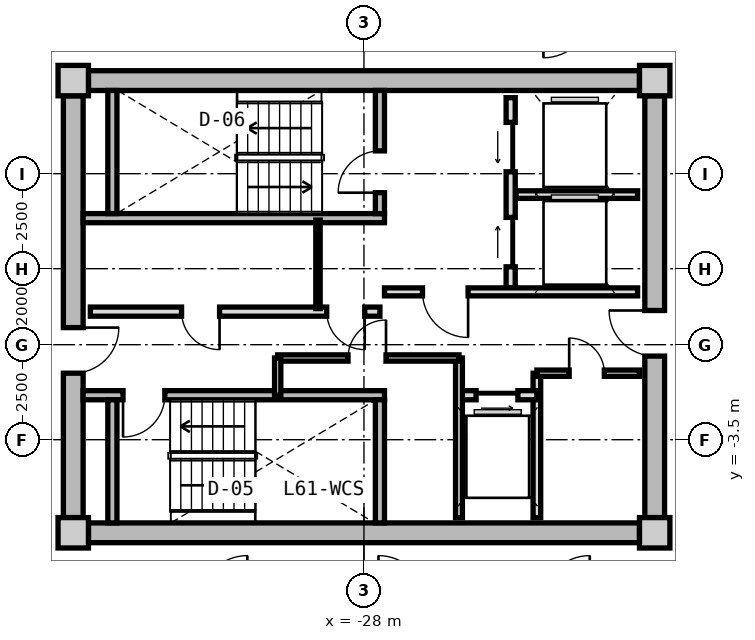
"""IFC4 building model, lengths in metres.
Left out: names, types, materials, properties, quantities, classifications, styles, units other than length and angle.
Written with IfcOpenShell. Run it as: python <this file> out.ifc"""

import sys

from ifc_helpers import new_model, si_unit, direction, frame, frame_2d, origin, origin_2d, place, context, subcontext, project, spatial, rectangle, extrude, source, transform, mapped, element, fill, save


model = new_model("IFC4")
c1 = context("Model", 3, precision=1e-05, world=origin(), true_north=direction((0.0, 1.0)))
c2 = subcontext(c1, "Body", "Model", "MODEL_VIEW")
j1 = project(units=[si_unit("LENGTHUNIT", "METRE"), si_unit("PLANEANGLEUNIT", "RADIAN")], contexts=[c1])
p1 = place(None, origin())
s1 = spatial("IfcSite", under=j1, at=p1, CompositionType="ELEMENT")
p2 = place(p1, origin())
s2 = spatial("IfcBuilding", under=s1, at=p2, CompositionType="ELEMENT")
p3 = place(p2, frame((0.0, 0.0, 196.75)))
s3 = spatial("IfcBuildingStorey", under=s2, at=p3, CompositionType="ELEMENT", Elevation=196.75)
m1 = source(origin(), c2, "Body", "SweptSolid", [
    extrude(rectangle(XDim=0.8, YDim=0.8, at=origin_2d()), origin(), (0.0, 0.0, 1.0), 3.05),
])
for number, where, z_axis, x_axis in (
    (1, (-35.65, -5.95, 0.0), (0.0, 0.0, 1.0), (1.0, 0.0, 0.0)),
    (2, (-20.35, -5.95, 0.0), (0.0, 0.0, 1.0), (1.0, 0.0, 0.0)),
    (3, (-20.35, 5.95, 0.0), (0.0, 0.0, 1.0), (1.0, 0.0, 0.0)),
    (4, (-35.65, 5.95, 0.0), (0.0, 0.0, 1.0), (1.0, 0.0, 0.0)),
):
    element("IfcColumn", number, at=place(p3, frame(where, z_axis=z_axis, x_axis=x_axis)), inside=s3, PredefinedType="COLUMN", context=c2, shape_type="MappedRepresentation", body=[
        mapped(m1, transform((0.0, 0.0, 0.0), x_axis=(1.0, 0.0, 0.0), y_axis=(0.0, 1.0, 0.0), z_axis=(0.0, 0.0, 1.0), scale=1.0)),
    ])
m2 = source(origin(), c2, "Body", "SweptSolid", [
    extrude(rectangle(XDim=14.5, YDim=0.52, at=frame_2d((7.25, 0.0))), origin(), (0.0, 0.0, 1.0), 2.76),
])
for number, where, z_axis, x_axis in (
    (5, (-35.25, 5.95, 0.0), (0.0, 0.0, 1.0), (1.0, 0.0, 0.0)),
    (6, (-20.75, -5.95, 0.0), (0.0, 0.0, 1.0), (-1.0, 0.0, 0.0)),
):
    element("IfcWall", number, at=place(p3, frame(where, z_axis=z_axis, x_axis=x_axis)), inside=s3, PredefinedType="SHEAR", context=c2, shape_type="MappedRepresentation", body=[
        mapped(m2, transform((0.0, 0.0, 0.0), x_axis=(1.0, 0.0, 0.0), y_axis=(0.0, 1.0, 0.0), z_axis=(0.0, 0.0, 1.0), scale=1.0)),
    ])
m3 = source(origin(), c2, "Body", "SweptSolid", [
    extrude(rectangle(XDim=11.1, YDim=0.52, at=frame_2d((5.55, 0.0))), origin(), (0.0, 0.0, 1.0), 2.76),
])
p4 = place(p3, frame((-35.65, -5.55, 0.0), z_axis=(0.0, 0.0, 1.0), x_axis=(0.0, 1.0, 0.0)))
e7 = element("IfcWall", 7, at=p4, inside=s3, PredefinedType="SHEAR", context=c2, shape_type="MappedRepresentation", body=[
    mapped(m3, transform((0.0, 0.0, 0.0), x_axis=(1.0, 0.0, 0.0), y_axis=(0.0, 1.0, 0.0), z_axis=(0.0, 0.0, 1.0), scale=1.0)),
])
p5 = place(p4, frame((3.8, 0.0, 0.0)))
e8 = element("IfcOpeningElement", 8, at=p5, cuts=e7, PredefinedType="OPENING", context=c2, shape_type="SweptSolid", body=[
    extrude(rectangle(XDim=1.2, YDim=2.15, at=frame_2d((0.6, 1.075))), frame((0.0, 0.27, 0.0), z_axis=(0.0, -1.0, 0.0), x_axis=(1.0, 0.0, 0.0)), (0.0, 0.0, 1.0), 0.54),
])
p6 = place(p3, frame((-20.35, 5.55, 0.0), z_axis=(0.0, 0.0, 1.0), x_axis=(0.0, -1.0, 0.0)))
e9 = element("IfcWall", 9, at=p6, inside=s3, PredefinedType="SHEAR", context=c2, shape_type="MappedRepresentation", body=[
    mapped(m3, transform((0.0, 0.0, 0.0), x_axis=(1.0, 0.0, 0.0), y_axis=(0.0, 1.0, 0.0), z_axis=(0.0, 0.0, 1.0), scale=1.0)),
])
p7 = place(p6, frame((5.65, 0.0, 0.0)))
e10 = element("IfcOpeningElement", 10, at=p7, cuts=e9, PredefinedType="OPENING", context=c2, shape_type="SweptSolid", body=[
    extrude(rectangle(XDim=1.2, YDim=2.15, at=frame_2d((0.6, 1.075))), frame((0.0, 0.27, 0.0), z_axis=(0.0, -1.0, 0.0), x_axis=(1.0, 0.0, 0.0)), (0.0, 0.0, 1.0), 0.54),
])
m4 = source(origin(), c2, "Body", "SweptSolid", [
    extrude(rectangle(XDim=7.93, YDim=0.24, at=frame_2d((3.965, 0.0))), origin(), (0.0, 0.0, 1.0), 2.76),
])
p8 = place(p3, frame((-35.39, 2.33, 0.0), z_axis=(0.0, 0.0, 1.0), x_axis=(1.0, 0.0, 0.0)))
e11 = element("IfcWall", 11, at=p8, inside=s3, PredefinedType="PARTITIONING", context=c2, shape_type="MappedRepresentation", body=[
    mapped(m4, transform((0.0, 0.0, 0.0), x_axis=(1.0, 0.0, 0.0), y_axis=(0.0, 1.0, 0.0), z_axis=(0.0, 0.0, 1.0), scale=1.0)),
])
m5 = source(origin(), c2, "Body", "SweptSolid", [
    extrude(rectangle(XDim=3.24, YDim=0.24, at=frame_2d((1.62, 0.0))), origin(), (0.0, 0.0, 1.0), 2.76),
])
p9 = place(p3, frame((-34.62, 2.45, 0.0), z_axis=(0.0, 0.0, 1.0), x_axis=(0.0, 1.0, 0.0)))
e12 = element("IfcWall", 12, at=p9, inside=s3, PredefinedType="PARTITIONING", context=c2, shape_type="MappedRepresentation", body=[
    mapped(m5, transform((0.0, 0.0, 0.0), x_axis=(1.0, 0.0, 0.0), y_axis=(0.0, 1.0, 0.0), z_axis=(0.0, 0.0, 1.0), scale=1.0)),
])
p10 = place(p3, frame((-27.58, 2.45, 0.0), z_axis=(0.0, 0.0, 1.0), x_axis=(0.0, 1.0, 0.0)))
e13 = element("IfcWall", 13, at=p10, inside=s3, PredefinedType="PARTITIONING", context=c2, shape_type="MappedRepresentation", body=[
    mapped(m5, transform((0.0, 0.0, 0.0), x_axis=(1.0, 0.0, 0.0), y_axis=(0.0, 1.0, 0.0), z_axis=(0.0, 0.0, 1.0), scale=1.0)),
])
p11 = place(p10, frame((0.55, 0.0, 0.0)))
e14 = element("IfcOpeningElement", 14, at=p11, cuts=e13, PredefinedType="OPENING", context=c2, shape_type="SweptSolid", body=[
    extrude(rectangle(XDim=1.1, YDim=2.15, at=frame_2d((0.55, 1.075))), frame((0.0, 0.13, 0.0), z_axis=(0.0, -1.0, 0.0), x_axis=(1.0, 0.0, 0.0)), (0.0, 0.0, 1.0), 0.26),
])
p12 = place(p3, frame((-35.39, -2.33, 0.0), z_axis=(0.0, 0.0, 1.0), x_axis=(1.0, 0.0, 0.0)))
e15 = element("IfcWall", 15, at=p12, inside=s3, PredefinedType="PARTITIONING", context=c2, shape_type="MappedRepresentation", body=[
    mapped(m4, transform((0.0, 0.0, 0.0), x_axis=(1.0, 0.0, 0.0), y_axis=(0.0, 1.0, 0.0), z_axis=(0.0, 0.0, 1.0), scale=1.0)),
])
p13 = place(p12, frame((1.05, 0.0, 0.0)))
e16 = element("IfcOpeningElement", 16, at=p13, cuts=e15, PredefinedType="OPENING", context=c2, shape_type="SweptSolid", body=[
    extrude(rectangle(XDim=1.1, YDim=2.15, at=frame_2d((0.55, 1.075))), frame((0.0, 0.13, 0.0), z_axis=(0.0, -1.0, 0.0), x_axis=(1.0, 0.0, 0.0)), (0.0, 0.0, 1.0), 0.26),
])
for number, where, z_axis, x_axis in (
    (17, (-34.62, -5.69, 0.0), (0.0, 0.0, 1.0), (0.0, 1.0, 0.0)),
    (18, (-27.58, -5.69, 0.0), (0.0, 0.0, 1.0), (0.0, 1.0, 0.0)),
):
    element("IfcWall", number, at=place(p3, frame(where, z_axis=z_axis, x_axis=x_axis)), inside=s3, PredefinedType="PARTITIONING", context=c2, shape_type="MappedRepresentation", body=[
        mapped(m5, transform((0.0, 0.0, 0.0), x_axis=(1.0, 0.0, 0.0), y_axis=(0.0, 1.0, 0.0), z_axis=(0.0, 0.0, 1.0), scale=1.0)),
    ])
m6 = source(origin(), c2, "Body", "SweptSolid", [
    extrude(rectangle(XDim=5.0, YDim=0.24, at=frame_2d((2.5, 0.0))), origin(), (0.0, 0.0, 1.0), 2.745),
])
p14 = place(p3, frame((-24.14, 0.5, 0.0), z_axis=(0.0, 0.0, 1.0), x_axis=(0.0, 1.0, 0.0)))
e19 = element("IfcWall", 19, at=p14, inside=s3, PredefinedType="PARTITIONING", context=c2, shape_type="MappedRepresentation", body=[
    mapped(m6, transform((0.0, 0.0, 0.0), x_axis=(1.0, 0.0, 0.0), y_axis=(0.0, 1.0, 0.0), z_axis=(0.0, 0.0, 1.0), scale=1.0)),
])
p15 = place(p14, frame((3.05, 0.0, 0.0)))
e20 = element("IfcOpeningElement", 20, at=p15, cuts=e19, PredefinedType="OPENING", context=c2, shape_type="SweptSolid", body=[
    extrude(rectangle(XDim=1.3, YDim=2.2, at=frame_2d((0.65, 1.1))), frame((0.0, 0.13, 0.0), z_axis=(0.0, -1.0, 0.0), x_axis=(1.0, 0.0, 0.0)), (0.0, 0.0, 1.0), 0.26),
])
p16 = place(p14, frame((0.55, 0.0, 0.0)))
e21 = element("IfcOpeningElement", 21, at=p16, cuts=e19, PredefinedType="OPENING", context=c2, shape_type="SweptSolid", body=[
    extrude(rectangle(XDim=1.3, YDim=2.2, at=frame_2d((0.65, 1.1))), frame((0.0, 0.13, 0.0), z_axis=(0.0, -1.0, 0.0), x_axis=(1.0, 0.0, 0.0)), (0.0, 0.0, 1.0), 0.26),
])
m7 = source(origin(), c2, "Body", "SweptSolid", [
    extrude(rectangle(XDim=3.2, YDim=0.2, at=frame_2d((1.6, 0.0))), origin(), (0.0, 0.0, 1.0), 2.745),
])
p17 = place(p3, frame((-24.0, 2.95, 0.0), z_axis=(0.0, 0.0, 1.0), x_axis=(1.0, 0.0, 0.0)))
e22 = element("IfcWall", 22, at=p17, inside=s3, PredefinedType="PARTITIONING", context=c2, shape_type="MappedRepresentation", body=[
    mapped(m7, transform((0.0, 0.0, 0.0), x_axis=(1.0, 0.0, 0.0), y_axis=(0.0, 1.0, 0.0), z_axis=(0.0, 0.0, 1.0), scale=1.0)),
])
m8 = source(origin(), c2, "Body", "SweptSolid", [
    extrude(rectangle(XDim=6.66, YDim=0.21, at=frame_2d((3.33, 0.0))), origin(), (0.0, 0.0, 1.0), 2.745),
])
p18 = place(p3, frame((-27.46, 0.39, 0.0), z_axis=(0.0, 0.0, 1.0), x_axis=(1.0, 0.0, 0.0)))
e23 = element("IfcWall", 23, at=p18, inside=s3, PredefinedType="PARTITIONING", context=c2, shape_type="MappedRepresentation", body=[
    mapped(m8, transform((0.0, 0.0, 0.0), x_axis=(1.0, 0.0, 0.0), y_axis=(0.0, 1.0, 0.0), z_axis=(0.0, 0.0, 1.0), scale=1.0)),
])
p19 = place(p18, frame((1.0, 0.0, 0.0)))
e24 = element("IfcOpeningElement", 24, at=p19, cuts=e23, PredefinedType="OPENING", context=c2, shape_type="SweptSolid", body=[
    extrude(rectangle(XDim=1.2, YDim=2.15, at=frame_2d((0.6, 1.075))), frame((0.0, 0.115, 0.0), z_axis=(0.0, -1.0, 0.0), x_axis=(1.0, 0.0, 0.0)), (0.0, 0.0, 1.0), 0.23),
])
m9 = source(origin(), c2, "Body", "SweptSolid", [
    extrude(rectangle(XDim=7.62, YDim=0.24, at=frame_2d((3.81, 0.0))), origin(), (0.0, 0.0, 1.0), 2.745),
])
p20 = place(p3, frame((-35.2, -0.13, 0.0), z_axis=(0.0, 0.0, 1.0), x_axis=(1.0, 0.0, 0.0)))
e25 = element("IfcWall", 25, at=p20, inside=s3, PredefinedType="PARTITIONING", context=c2, shape_type="MappedRepresentation", body=[
    mapped(m9, transform((0.0, 0.0, 0.0), x_axis=(1.0, 0.0, 0.0), y_axis=(0.0, 1.0, 0.0), z_axis=(0.0, 0.0, 1.0), scale=1.0)),
])
p21 = place(p20, frame((6.22, 0.0, 0.0)))
e26 = element("IfcOpeningElement", 26, at=p21, cuts=e25, PredefinedType="OPENING", context=c2, shape_type="SweptSolid", body=[
    extrude(rectangle(XDim=1.0, YDim=2.1, at=frame_2d((0.5, 1.05))), frame((0.0, 0.13, 0.0), z_axis=(0.0, -1.0, 0.0), x_axis=(1.0, 0.0, 0.0)), (0.0, 0.0, 1.0), 0.26),
])
p22 = place(p20, frame((2.4, 0.0, 0.0)))
e27 = element("IfcOpeningElement", 27, at=p22, cuts=e25, PredefinedType="OPENING", context=c2, shape_type="SweptSolid", body=[
    extrude(rectangle(XDim=1.0, YDim=2.1, at=frame_2d((0.5, 1.05))), frame((0.0, 0.13, 0.0), z_axis=(0.0, -1.0, 0.0), x_axis=(1.0, 0.0, 0.0)), (0.0, 0.0, 1.0), 0.26),
])
m10 = source(origin(), c2, "Body", "SweptSolid", [
    extrude(rectangle(XDim=2.33, YDim=0.115, at=frame_2d((1.165, 0.0))), origin(), (0.0, 0.0, 1.0), 2.745),
])
p23 = place(p3, frame((-29.21, -0.05, 0.0), z_axis=(0.0, 0.0, 1.0), x_axis=(0.0, 1.0, 0.0)))
e28 = element("IfcWall", 28, at=p23, inside=s3, PredefinedType="PARTITIONING", context=c2, shape_type="MappedRepresentation", body=[
    mapped(m10, transform((0.0, 0.0, 0.0), x_axis=(1.0, 0.0, 0.0), y_axis=(0.0, 1.0, 0.0), z_axis=(0.0, 0.0, 1.0), scale=1.0)),
])
m11 = source(origin(), c2, "Body", "SweptSolid", [
    extrude(rectangle(XDim=3.8, YDim=0.2, at=frame_2d((1.9, 0.0))), origin(), (0.0, 0.0, 1.0), 2.745),
])
p24 = place(p3, frame((-23.45, -5.55, 0.0), z_axis=(0.0, 0.0, 1.0), x_axis=(0.0, 1.0, 0.0)))
e29 = element("IfcWall", 29, at=p24, inside=s3, PredefinedType="PARTITIONING", context=c2, shape_type="MappedRepresentation", body=[
    mapped(m11, transform((0.0, 0.0, 0.0), x_axis=(1.0, 0.0, 0.0), y_axis=(0.0, 1.0, 0.0), z_axis=(0.0, 0.0, 1.0), scale=1.0)),
])
m12 = source(origin(), c2, "Body", "SweptSolid", [
    extrude(rectangle(XDim=2.05, YDim=0.24, at=frame_2d((1.025, 0.0))), origin(), (0.0, 0.0, 1.0), 2.745),
])
p25 = place(p3, frame((-25.5, -2.33, 0.0), z_axis=(0.0, 0.0, 1.0), x_axis=(1.0, 0.0, 0.0)))
e30 = element("IfcWall", 30, at=p25, inside=s3, PredefinedType="PARTITIONING", context=c2, shape_type="MappedRepresentation", body=[
    mapped(m12, transform((0.0, 0.0, 0.0), x_axis=(1.0, 0.0, 0.0), y_axis=(0.0, 1.0, 0.0), z_axis=(0.0, 0.0, 1.0), scale=1.0)),
])
p26 = place(p25, frame((0.45, 0.0, 0.0)))
e31 = element("IfcOpeningElement", 31, at=p26, cuts=e30, PredefinedType="OPENING", context=c2, shape_type="SweptSolid", body=[
    extrude(rectangle(XDim=1.1, YDim=2.2, at=frame_2d((0.55, 1.1))), frame((0.0, 0.13, 0.0), z_axis=(0.0, -1.0, 0.0), x_axis=(1.0, 0.0, 0.0)), (0.0, 0.0, 1.0), 0.26),
])
m13 = source(origin(), c2, "Body", "SweptSolid", [
    extrude(rectangle(XDim=4.2, YDim=0.18, at=frame_2d((2.1, 0.0))), origin(), (0.0, 0.0, 1.0), 2.745),
])
p27 = place(p3, frame((-25.5, -5.55, 0.0), z_axis=(0.0, 0.0, 1.0), x_axis=(0.0, 1.0, 0.0)))
e32 = element("IfcWall", 32, at=p27, inside=s3, PredefinedType="PARTITIONING", context=c2, shape_type="MappedRepresentation", body=[
    mapped(m13, transform((0.0, 0.0, 0.0), x_axis=(1.0, 0.0, 0.0), y_axis=(0.0, 1.0, 0.0), z_axis=(0.0, 0.0, 1.0), scale=1.0)),
])
m14 = source(origin(), c2, "Body", "SweptSolid", [
    extrude(rectangle(XDim=4.77, YDim=0.165, at=frame_2d((2.385, 0.0))), origin(), (0.0, 0.0, 1.0), 2.745),
])
p28 = place(p3, frame((-30.27, -1.35, 0.0), z_axis=(0.0, 0.0, 1.0), x_axis=(1.0, 0.0, 0.0)))
e33 = element("IfcWall", 33, at=p28, inside=s3, PredefinedType="PARTITIONING", context=c2, shape_type="MappedRepresentation", body=[
    mapped(m14, transform((0.0, 0.0, 0.0), x_axis=(1.0, 0.0, 0.0), y_axis=(0.0, 1.0, 0.0), z_axis=(0.0, 0.0, 1.0), scale=1.0)),
])
p29 = place(p28, frame((1.85, 0.0, 0.0)))
e34 = element("IfcOpeningElement", 34, at=p29, cuts=e33, PredefinedType="OPENING", context=c2, shape_type="SweptSolid", body=[
    extrude(rectangle(XDim=1.0, YDim=2.1, at=frame_2d((0.5, 1.05))), frame((0.0, 0.093, 0.0), z_axis=(0.0, -1.0, 0.0), x_axis=(1.0, 0.0, 0.0)), (0.0, 0.0, 1.0), 0.185),
])
m15 = source(origin(), c2, "Body", "SweptSolid", [
    extrude(rectangle(XDim=0.98, YDim=0.165, at=frame_2d((0.49, 0.0))), origin(), (0.0, 0.0, 1.0), 2.745),
])
p30 = place(p3, frame((-30.27, -2.33, 0.0), z_axis=(0.0, 0.0, 1.0), x_axis=(0.0, 1.0, 0.0)))
e35 = element("IfcWall", 35, at=p30, inside=s3, PredefinedType="PARTITIONING", context=c2, shape_type="MappedRepresentation", body=[
    mapped(m15, transform((0.0, 0.0, 0.0), x_axis=(1.0, 0.0, 0.0), y_axis=(0.0, 1.0, 0.0), z_axis=(0.0, 0.0, 1.0), scale=1.0)),
])
m16 = source(origin(), c2, "Body", "SweptSolid", [
    extrude(rectangle(XDim=2.7, YDim=0.165, at=frame_2d((1.35, 0.0))), origin(), (0.0, 0.0, 1.0), 2.745),
])
p31 = place(p3, frame((-23.45, -1.75, 0.0), z_axis=(0.0, 0.0, 1.0), x_axis=(1.0, 0.0, 0.0)))
e36 = element("IfcWall", 36, at=p31, inside=s3, PredefinedType="PARTITIONING", context=c2, shape_type="MappedRepresentation", body=[
    mapped(m16, transform((0.0, 0.0, 0.0), x_axis=(1.0, 0.0, 0.0), y_axis=(0.0, 1.0, 0.0), z_axis=(0.0, 0.0, 1.0), scale=1.0)),
])
p32 = place(p31, frame((0.85, 0.0, 0.0)))
e37 = element("IfcOpeningElement", 37, at=p32, cuts=e36, PredefinedType="OPENING", context=c2, shape_type="SweptSolid", body=[
    extrude(rectangle(XDim=0.925, YDim=2.1, at=frame_2d((0.462, 1.05))), frame((0.0, 0.093, 0.0), z_axis=(0.0, -1.0, 0.0), x_axis=(1.0, 0.0, 0.0)), (0.0, 0.0, 1.0), 0.185),
])
m17 = source(origin(), c2, "Body", "SweptSolid", [
    extrude(rectangle(XDim=1.1, YDim=2.15, at=frame_2d((0.55, 1.075))), frame((0.0, 0.025, 0.0), z_axis=(0.0, -1.0, 0.0), x_axis=(1.0, 0.0, 0.0)), (0.0, 0.0, 1.0), 0.05),
])
p33 = place(p11, origin())
e38 = element("IfcDoor", 38, at=p33, inside=s3, OperationType="SINGLE_SWING_LEFT", PredefinedType="DOOR", context=c2, shape_type="MappedRepresentation", body=[
    mapped(m17, transform((0.0, 0.0, 0.0), x_axis=(1.0, 0.0, 0.0), y_axis=(0.0, 1.0, 0.0), z_axis=(0.0, 0.0, 1.0), scale=1.0)),
])
fill(e14, e38)
p34 = place(p13, frame((1.1, 0.0, 0.0), z_axis=(0.0, 0.0, 1.0), x_axis=(-1.0, 0.0, 0.0)))
e39 = element("IfcDoor", 39, at=p34, inside=s3, OperationType="SINGLE_SWING_RIGHT", PredefinedType="DOOR", context=c2, shape_type="MappedRepresentation", body=[
    mapped(m17, transform((0.0, 0.0, 0.0), x_axis=(1.0, 0.0, 0.0), y_axis=(0.0, 1.0, 0.0), z_axis=(0.0, 0.0, 1.0), scale=1.0)),
])
fill(e16, e39)
m18 = source(origin(), c2, "Body", "SweptSolid", [
    extrude(rectangle(XDim=1.3, YDim=2.2, at=frame_2d((0.65, 1.1))), frame((0.0, 0.025, 0.0), z_axis=(0.0, -1.0, 0.0), x_axis=(1.0, 0.0, 0.0)), (0.0, 0.0, 1.0), 0.05),
])
p35 = place(p15, origin())
e40 = element("IfcDoor", 40, at=p35, inside=s3, OperationType="SLIDING_TO_LEFT", PredefinedType="DOOR", context=c2, shape_type="MappedRepresentation", body=[
    mapped(m18, transform((0.0, 0.0, 0.0), x_axis=(1.0, 0.0, 0.0), y_axis=(0.0, 1.0, 0.0), z_axis=(0.0, 0.0, 1.0), scale=1.0)),
])
fill(e20, e40)
p36 = place(p16, origin())
e41 = element("IfcDoor", 41, at=p36, inside=s3, OperationType="SLIDING_TO_RIGHT", PredefinedType="DOOR", context=c2, shape_type="MappedRepresentation", body=[
    mapped(m18, transform((0.0, 0.0, 0.0), x_axis=(1.0, 0.0, 0.0), y_axis=(0.0, 1.0, 0.0), z_axis=(0.0, 0.0, 1.0), scale=1.0)),
])
fill(e21, e41)
m19 = source(origin(), c2, "Body", "SweptSolid", [
    extrude(rectangle(XDim=1.2, YDim=2.15, at=frame_2d((0.6, 1.075))), frame((0.0, 0.025, 0.0), z_axis=(0.0, -1.0, 0.0), x_axis=(1.0, 0.0, 0.0)), (0.0, 0.0, 1.0), 0.05),
])
p37 = place(p19, frame((1.2, 0.0, 0.0), z_axis=(0.0, 0.0, 1.0), x_axis=(-1.0, 0.0, 0.0)))
e42 = element("IfcDoor", 42, at=p37, inside=s3, OperationType="SINGLE_SWING_LEFT", PredefinedType="DOOR", context=c2, shape_type="MappedRepresentation", body=[
    mapped(m19, transform((0.0, 0.0, 0.0), x_axis=(1.0, 0.0, 0.0), y_axis=(0.0, 1.0, 0.0), z_axis=(0.0, 0.0, 1.0), scale=1.0)),
])
fill(e24, e42)
p38 = place(p5, frame((1.2, 0.0, 0.0), z_axis=(0.0, 0.0, 1.0), x_axis=(-1.0, 0.0, 0.0)))
e43 = element("IfcDoor", 43, at=p38, inside=s3, OperationType="SINGLE_SWING_LEFT", PredefinedType="DOOR", context=c2, shape_type="MappedRepresentation", body=[
    mapped(m19, transform((0.0, 0.0, 0.0), x_axis=(1.0, 0.0, 0.0), y_axis=(0.0, 1.0, 0.0), z_axis=(0.0, 0.0, 1.0), scale=1.0)),
])
fill(e8, e43)
p39 = place(p7, frame((1.2, 0.0, 0.0), z_axis=(0.0, 0.0, 1.0), x_axis=(-1.0, 0.0, 0.0)))
e44 = element("IfcDoor", 44, at=p39, inside=s3, OperationType="SINGLE_SWING_RIGHT", PredefinedType="DOOR", context=c2, shape_type="MappedRepresentation", body=[
    mapped(m19, transform((0.0, 0.0, 0.0), x_axis=(1.0, 0.0, 0.0), y_axis=(0.0, 1.0, 0.0), z_axis=(0.0, 0.0, 1.0), scale=1.0)),
])
fill(e10, e44)
m20 = source(origin(), c2, "Body", "SweptSolid", [
    extrude(rectangle(XDim=1.0, YDim=2.1, at=frame_2d((0.5, 1.05))), frame((0.0, 0.025, 0.0), z_axis=(0.0, -1.0, 0.0), x_axis=(1.0, 0.0, 0.0)), (0.0, 0.0, 1.0), 0.05),
])
p40 = place(p21, frame((1.0, 0.0, 0.0), z_axis=(0.0, 0.0, 1.0), x_axis=(-1.0, 0.0, 0.0)))
e45 = element("IfcDoor", 45, at=p40, inside=s3, OperationType="SINGLE_SWING_LEFT", PredefinedType="DOOR", context=c2, shape_type="MappedRepresentation", body=[
    mapped(m20, transform((0.0, 0.0, 0.0), x_axis=(1.0, 0.0, 0.0), y_axis=(0.0, 1.0, 0.0), z_axis=(0.0, 0.0, 1.0), scale=1.0)),
])
fill(e26, e45)
p41 = place(p22, frame((1.0, 0.0, 0.0), z_axis=(0.0, 0.0, 1.0), x_axis=(-1.0, 0.0, 0.0)))
e46 = element("IfcDoor", 46, at=p41, inside=s3, OperationType="SINGLE_SWING_LEFT", PredefinedType="DOOR", context=c2, shape_type="MappedRepresentation", body=[
    mapped(m20, transform((0.0, 0.0, 0.0), x_axis=(1.0, 0.0, 0.0), y_axis=(0.0, 1.0, 0.0), z_axis=(0.0, 0.0, 1.0), scale=1.0)),
])
fill(e27, e46)
m21 = source(origin(), c2, "Body", "SweptSolid", [
    extrude(rectangle(XDim=1.1, YDim=2.2, at=frame_2d((0.55, 1.1))), frame((0.0, 0.025, 0.0), z_axis=(0.0, -1.0, 0.0), x_axis=(1.0, 0.0, 0.0)), (0.0, 0.0, 1.0), 0.05),
])
p42 = place(p26, frame((1.1, 0.0, 0.0), z_axis=(0.0, 0.0, 1.0), x_axis=(-1.0, 0.0, 0.0)))
e47 = element("IfcDoor", 47, at=p42, inside=s3, OperationType="SLIDING_TO_RIGHT", PredefinedType="DOOR", context=c2, shape_type="MappedRepresentation", body=[
    mapped(m21, transform((0.0, 0.0, 0.0), x_axis=(1.0, 0.0, 0.0), y_axis=(0.0, 1.0, 0.0), z_axis=(0.0, 0.0, 1.0), scale=1.0)),
])
fill(e31, e47)
p43 = place(p29, origin())
e48 = element("IfcDoor", 48, at=p43, inside=s3, OperationType="SINGLE_SWING_RIGHT", PredefinedType="DOOR", context=c2, shape_type="MappedRepresentation", body=[
    mapped(m20, transform((0.0, 0.0, 0.0), x_axis=(1.0, 0.0, 0.0), y_axis=(0.0, 1.0, 0.0), z_axis=(0.0, 0.0, 1.0), scale=1.0)),
])
fill(e34, e48)
m22 = source(origin(), c2, "Body", "SweptSolid", [
    extrude(rectangle(XDim=0.925, YDim=2.1, at=frame_2d((0.462, 1.05))), frame((0.0, 0.025, 0.0), z_axis=(0.0, -1.0, 0.0), x_axis=(1.0, 0.0, 0.0)), (0.0, 0.0, 1.0), 0.05),
])
p44 = place(p32, origin())
e49 = element("IfcDoor", 49, at=p44, inside=s3, OperationType="SINGLE_SWING_LEFT", PredefinedType="DOOR", context=c2, shape_type="MappedRepresentation", body=[
    mapped(m22, transform((0.0, 0.0, 0.0), x_axis=(1.0, 0.0, 0.0), y_axis=(0.0, 1.0, 0.0), z_axis=(0.0, 0.0, 1.0), scale=1.0)),
])
fill(e37, e49)
save(model, sys.argv[1])
